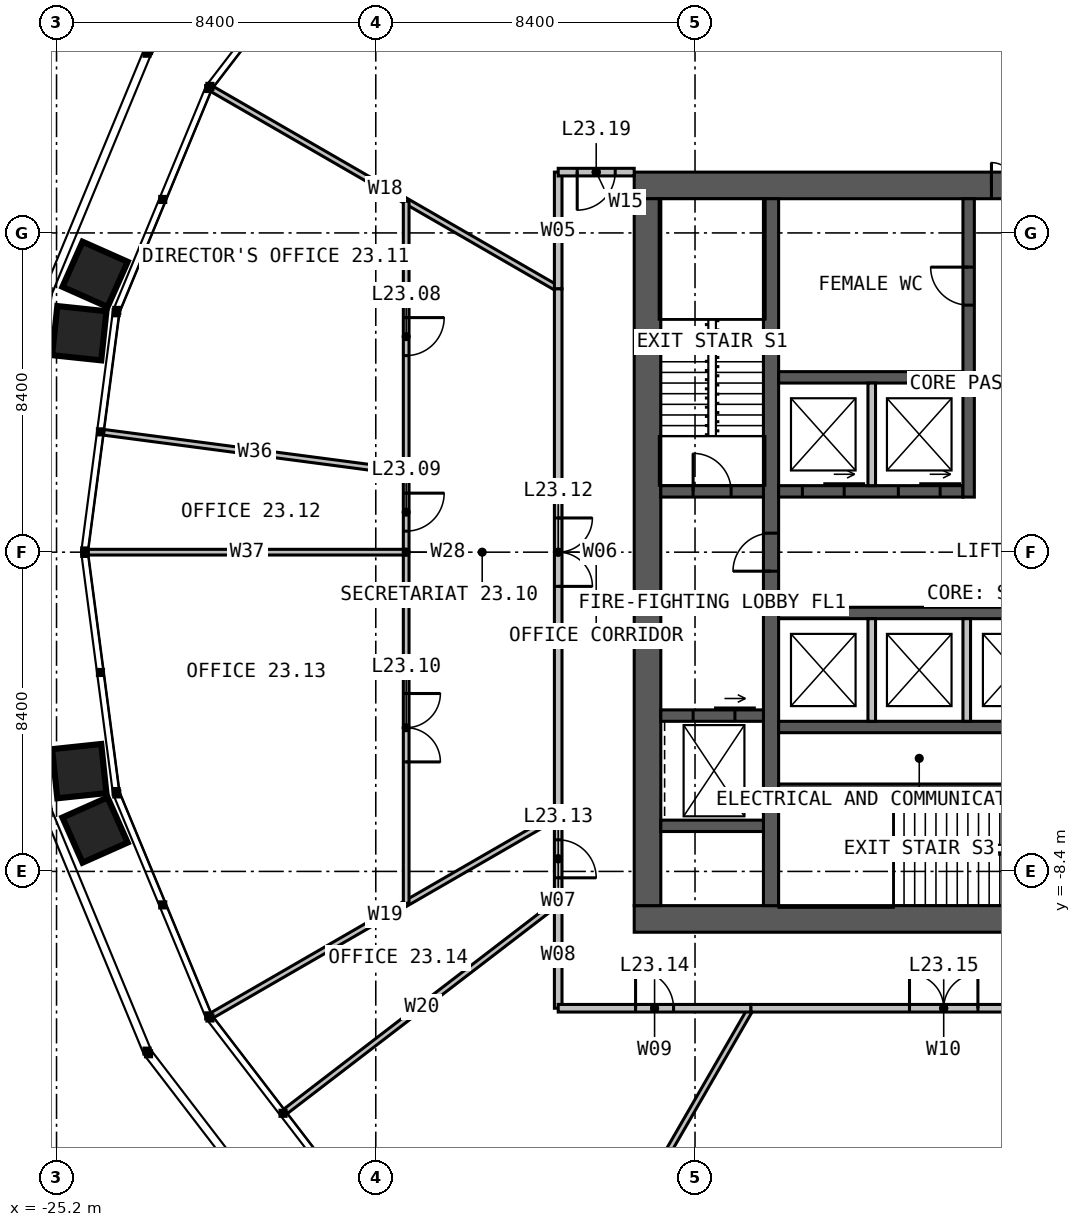
"""IFC4 building model, lengths in metres.
Left out: names, types, materials, properties, quantities, classifications, styles, units other than length and angle.
Written with IfcOpenShell. Run it as: python <this file> out.ifc"""

import sys

from ifc_helpers import new_model, si_unit, direction, frame, frame_2d, origin, place, context, subcontext, project, spatial, rectangle, extrude, element, fill, save


model = new_model("IFC4")
c1 = context("Model", 3, precision=1e-05, world=origin(), true_north=direction((0.0, 1.0)))
c2 = subcontext(c1, "Body", "Model", "MODEL_VIEW")
j1 = project(units=[si_unit("LENGTHUNIT", "METRE"), si_unit("PLANEANGLEUNIT", "RADIAN")], contexts=[c1])
p1 = place(None, origin())
s1 = spatial("IfcSite", under=j1, at=p1, CompositionType="ELEMENT")
p2 = place(p1, origin())
s2 = spatial("IfcBuilding", under=s1, at=p2, CompositionType="ELEMENT")
p3 = place(p2, frame((0.0, 0.0, 98.0)))
s3 = spatial("IfcBuildingStorey", under=s2, at=p3, CompositionType="ELEMENT", Elevation=98.0)
p4 = place(p3, frame((-10.0, 9.65, 0.0), z_axis=(0.0, 0.0, 1.0), x_axis=(1.0, 0.0, 0.0)))
e1 = element("IfcWall", 1, at=p4, inside=s3, PredefinedType="SOLIDWALL", context=c2, shape_type="SweptSolid", body=[
    extrude(rectangle(XDim=20.0, YDim=0.7, at=frame_2d((10.0, 0.0))), origin(), (0.0, 0.0, 1.0), 4.0),
])
p5 = place(p4, frame((9.4, 0.0, 0.0)))
e2 = element("IfcOpeningElement", 2, at=p5, cuts=e1, PredefinedType="OPENING", context=c2, shape_type="SweptSolid", body=[
    extrude(rectangle(XDim=1.2, YDim=2.2, at=frame_2d((0.6, 1.1))), frame((0.0, 0.36, 0.0), z_axis=(0.0, -1.0, 0.0), x_axis=(1.0, 0.0, 0.0)), (0.0, 0.0, 1.0), 0.72),
])
p6 = place(p3, frame((10.0, -9.65, 0.0), z_axis=(0.0, 0.0, 1.0), x_axis=(-1.0, 0.0, 0.0)))
e3 = element("IfcWall", 3, at=p6, inside=s3, PredefinedType="SOLIDWALL", context=c2, shape_type="SweptSolid", body=[
    extrude(rectangle(XDim=20.0, YDim=0.7, at=frame_2d((10.0, 0.0))), origin(), (0.0, 0.0, 1.0), 4.0),
])
p7 = place(p6, frame((6.875, 0.0, 0.0)))
e4 = element("IfcOpeningElement", 4, at=p7, cuts=e3, PredefinedType="OPENING", context=c2, shape_type="SweptSolid", body=[
    extrude(rectangle(XDim=1.2, YDim=2.2, at=frame_2d((0.6, 1.1))), frame((0.0, 0.36, 0.0), z_axis=(0.0, -1.0, 0.0), x_axis=(1.0, 0.0, 0.0)), (0.0, 0.0, 1.0), 0.72),
])
p8 = place(p3, frame((-9.65, 9.3, 0.0), z_axis=(0.0, 0.0, 1.0), x_axis=(0.0, -1.0, 0.0)))
e5 = element("IfcWall", 5, at=p8, inside=s3, PredefinedType="SOLIDWALL", context=c2, shape_type="SweptSolid", body=[
    extrude(rectangle(XDim=18.6, YDim=0.7, at=frame_2d((9.3, 0.0))), origin(), (0.0, 0.0, 1.0), 4.0),
])
p9 = place(p3, frame((-6.4, -9.3, 0.0), z_axis=(0.0, 0.0, 1.0), x_axis=(0.0, 1.0, 0.0)))
e6 = element("IfcWall", 6, at=p9, inside=s3, PredefinedType="SOLIDWALL", context=c2, shape_type="SweptSolid", body=[
    extrude(rectangle(XDim=18.6, YDim=0.4, at=frame_2d((9.3, 0.0))), origin(), (0.0, 0.0, 1.0), 4.0),
])
p10 = place(p9, frame((8.8, 0.0, 0.0)))
e7 = element("IfcOpeningElement", 7, at=p10, cuts=e6, PredefinedType="OPENING", context=c2, shape_type="SweptSolid", body=[
    extrude(rectangle(XDim=1.0, YDim=2.2, at=frame_2d((0.5, 1.1))), frame((0.0, 0.21, 0.0), z_axis=(0.0, -1.0, 0.0), x_axis=(1.0, 0.0, 0.0)), (0.0, 0.0, 1.0), 0.42),
])
p11 = place(p3, frame((-6.2, 1.6, 0.0), z_axis=(0.0, 0.0, 1.0), x_axis=(1.0, 0.0, 0.0)))
e8 = element("IfcWall", 8, at=p11, inside=s3, PredefinedType="SOLIDWALL", context=c2, shape_type="SweptSolid", body=[
    extrude(rectangle(XDim=4.85, YDim=0.3, at=frame_2d((2.425, 0.0))), origin(), (0.0, 0.0, 1.0), 4.0),
])
p12 = place(p11, frame((0.625, 0.0, 0.0)))
e9 = element("IfcOpeningElement", 9, at=p12, cuts=e8, PredefinedType="OPENING", context=c2, shape_type="SweptSolid", body=[
    extrude(rectangle(XDim=1.1, YDim=2.2, at=frame_2d((0.55, 1.1))), frame((0.0, 0.16, 0.0), z_axis=(0.0, -1.0, 0.0), x_axis=(1.0, 0.0, 0.0)), (0.0, 0.0, 1.0), 0.32),
])
p13 = place(p11, frame((3.15, 0.0, 0.0)))
e10 = element("IfcOpeningElement", 10, at=p13, cuts=e8, PredefinedType="OPENING", context=c2, shape_type="SweptSolid", body=[
    extrude(rectangle(XDim=1.1, YDim=2.2, at=frame_2d((0.55, 1.1))), frame((0.0, 0.16, 0.0), z_axis=(0.0, -1.0, 0.0), x_axis=(1.0, 0.0, 0.0)), (0.0, 0.0, 1.0), 0.32),
])
p14 = place(p3, frame((-6.2, 4.6, 0.0), z_axis=(0.0, 0.0, 1.0), x_axis=(1.0, 0.0, 0.0)))
e11 = element("IfcWall", 11, at=p14, inside=s3, PredefinedType="SOLIDWALL", context=c2, shape_type="SweptSolid", body=[
    extrude(rectangle(XDim=4.85, YDim=0.3, at=frame_2d((2.425, 0.0))), origin(), (0.0, 0.0, 1.0), 4.0),
])
p15 = place(p3, frame((-1.2, 1.45, 0.0), z_axis=(0.0, 0.0, 1.0), x_axis=(0.0, 1.0, 0.0)))
e12 = element("IfcWall", 12, at=p15, inside=s3, PredefinedType="SOLIDWALL", context=c2, shape_type="SweptSolid", body=[
    extrude(rectangle(XDim=7.85, YDim=0.3, at=frame_2d((3.925, 0.0))), origin(), (0.0, 0.0, 1.0), 4.0),
])
p16 = place(p15, frame((5.05, 0.0, 0.0)))
e13 = element("IfcOpeningElement", 13, at=p16, cuts=e12, PredefinedType="OPENING", context=c2, shape_type="SweptSolid", body=[
    extrude(rectangle(XDim=1.0, YDim=2.2, at=frame_2d((0.5, 1.1))), frame((0.0, 0.16, 0.0), z_axis=(0.0, -1.0, 0.0), x_axis=(1.0, 0.0, 0.0)), (0.0, 0.0, 1.0), 0.32),
])
for number, where, z_axis, x_axis in (
    (14, (-6.2, -1.6, 0.0), (0.0, 0.0, 1.0), (1.0, 0.0, 0.0)),
    (15, (-6.2, -4.6, 0.0), (0.0, 0.0, 1.0), (1.0, 0.0, 0.0)),
):
    element("IfcWall", number, at=place(p3, frame(where, z_axis=z_axis, x_axis=x_axis)), inside=s3, PredefinedType="SOLIDWALL", context=c2, shape_type="SweptSolid", body=[
        extrude(rectangle(XDim=7.4, YDim=0.3, at=frame_2d((3.7, 0.0))), origin(), (0.0, 0.0, 1.0), 4.0),
    ])
p17 = place(p3, frame((-6.2, -6.2, 0.0), z_axis=(0.0, 0.0, 1.0), x_axis=(1.0, 0.0, 0.0)))
e16 = element("IfcWall", 16, at=p17, inside=s3, PredefinedType="SOLIDWALL", context=c2, shape_type="SweptSolid", body=[
    extrude(rectangle(XDim=7.4, YDim=0.2, at=frame_2d((3.7, 0.0))), origin(), (0.0, 0.0, 1.0), 4.0),
])
p18 = place(p3, frame((-9.3, 1.6, 0.0), z_axis=(0.0, 0.0, 1.0), x_axis=(1.0, 0.0, 0.0)))
e17 = element("IfcWall", 17, at=p18, inside=s3, PredefinedType="SOLIDWALL", context=c2, shape_type="SweptSolid", body=[
    extrude(rectangle(XDim=2.7, YDim=0.3, at=frame_2d((1.35, 0.0))), origin(), (0.0, 0.0, 1.0), 4.0),
])
p19 = place(p18, frame((0.85, 0.0, 0.0)))
e18 = element("IfcOpeningElement", 18, at=p19, cuts=e17, PredefinedType="OPENING", context=c2, shape_type="SweptSolid", body=[
    extrude(rectangle(XDim=1.0, YDim=2.2, at=frame_2d((0.5, 1.1))), frame((0.0, 0.16, 0.0), z_axis=(0.0, -1.0, 0.0), x_axis=(1.0, 0.0, 0.0)), (0.0, 0.0, 1.0), 0.32),
])
p20 = place(p3, frame((-9.3, -4.3, 0.0), z_axis=(0.0, 0.0, 1.0), x_axis=(1.0, 0.0, 0.0)))
e19 = element("IfcWall", 19, at=p20, inside=s3, PredefinedType="SOLIDWALL", context=c2, shape_type="SweptSolid", body=[
    extrude(rectangle(XDim=2.7, YDim=0.3, at=frame_2d((1.35, 0.0))), origin(), (0.0, 0.0, 1.0), 4.0),
])
p21 = place(p20, frame((0.85, 0.0, 0.0)))
e20 = element("IfcOpeningElement", 20, at=p21, cuts=e19, PredefinedType="OPENING", context=c2, shape_type="SweptSolid", body=[
    extrude(rectangle(XDim=1.1, YDim=2.2, at=frame_2d((0.55, 1.1))), frame((0.0, 0.16, 0.0), z_axis=(0.0, -1.0, 0.0), x_axis=(1.0, 0.0, 0.0)), (0.0, 0.0, 1.0), 0.32),
])
p22 = place(p3, frame((-9.3, -7.2, 0.0), z_axis=(0.0, 0.0, 1.0), x_axis=(1.0, 0.0, 0.0)))
e21 = element("IfcWall", 21, at=p22, inside=s3, PredefinedType="SOLIDWALL", context=c2, shape_type="SweptSolid", body=[
    extrude(rectangle(XDim=2.7, YDim=0.3, at=frame_2d((1.35, 0.0))), origin(), (0.0, 0.0, 1.0), 4.0),
])
for number, where, z_axis, x_axis in (
    (22, (-3.75, 1.75, 0.0), (0.0, 0.0, 1.0), (0.0, 1.0, 0.0)),
    (23, (-3.75, -1.75, 0.0), (0.0, 0.0, 1.0), (0.0, -1.0, 0.0)),
    (24, (-1.25, -1.75, 0.0), (0.0, 0.0, 1.0), (0.0, -1.0, 0.0)),
):
    element("IfcWall", number, at=place(p3, frame(where, z_axis=z_axis, x_axis=x_axis)), inside=s3, PredefinedType="SOLIDWALL", context=c2, shape_type="SweptSolid", body=[
        extrude(rectangle(XDim=2.7, YDim=0.2, at=frame_2d((1.35, 0.0))), origin(), (0.0, 0.0, 1.0), 3.75),
    ])
for number, where, z_axis, x_axis in (
    (25, (-12.0, 6.928, 0.0), (0.0, 0.0, 1.0), (-0.866, 0.5, 0.0)),
    (26, (-12.0, -6.928, 0.0), (0.0, 0.0, 1.0), (-0.866, -0.5, 0.0)),
):
    element("IfcWall", number, at=place(p3, frame(where, z_axis=z_axis, x_axis=x_axis)), inside=s3, PredefinedType="PARTITIONING", context=c2, shape_type="SweptSolid", body=[
        extrude(rectangle(XDim=10.514, YDim=0.15, at=frame_2d((5.257, 0.0))), origin(), (0.0, 0.0, 1.0), 2.79),
    ])
p23 = place(p3, frame((-12.0, -9.208, 0.0), z_axis=(0.0, 0.0, 1.0), x_axis=(-0.793353631913, -0.60876104896, 0.0)))
e27 = element("IfcWall", 27, at=p23, inside=s3, PredefinedType="PARTITIONING", context=c2, shape_type="SweptSolid", body=[
    extrude(rectangle(XDim=9.036, YDim=0.15, at=frame_2d((4.518, 0.0))), origin(), (0.0, 0.0, 1.0), 2.79),
])
p24 = place(p3, frame((-6.928, -12.0, 0.0), z_axis=(0.0, 0.0, 1.0), x_axis=(-0.499995153367, -0.866028201971, 0.0)))
e28 = element("IfcWall", 28, at=p24, inside=s3, PredefinedType="PARTITIONING", context=c2, shape_type="SweptSolid", body=[
    extrude(rectangle(XDim=10.514, YDim=0.15, at=frame_2d((5.257, 0.0))), origin(), (0.0, 0.0, 1.0), 2.79),
])
p25 = place(p3, frame((-12.0, 10.0, 0.0), z_axis=(0.0, 0.0, 1.0), x_axis=(0.0, -1.0, 0.0)))
e29 = element("IfcWall", 29, at=p25, inside=s3, PredefinedType="PARTITIONING", context=c2, shape_type="SweptSolid", body=[
    extrude(rectangle(XDim=3.072, YDim=0.2, at=frame_2d((1.536, 0.0))), origin(), (0.0, 0.0, 1.0), 3.8),
])
p26 = place(p3, frame((-16.0, 9.238, 0.0), z_axis=(0.0, 0.0, 1.0), x_axis=(0.0, -1.0, 0.0)))
e30 = element("IfcWall", 30, at=p26, inside=s3, PredefinedType="PARTITIONING", context=c2, shape_type="SweptSolid", body=[
    extrude(rectangle(XDim=18.475, YDim=0.15, at=frame_2d((9.238, 0.0))), origin(), (0.0, 0.0, 1.0), 2.79),
])
p27 = place(p26, frame((3.066, 0.0, 0.0)))
e31 = element("IfcOpeningElement", 31, at=p27, cuts=e30, PredefinedType="OPENING", context=c2, shape_type="SweptSolid", body=[
    extrude(rectangle(XDim=1.0, YDim=2.2, at=frame_2d((0.5, 1.1))), frame((0.0, 0.085, 0.0), z_axis=(0.0, -1.0, 0.0), x_axis=(1.0, 0.0, 0.0)), (0.0, 0.0, 1.0), 0.17),
])
p28 = place(p26, frame((7.684, 0.0, 0.0)))
e32 = element("IfcOpeningElement", 32, at=p28, cuts=e30, PredefinedType="OPENING", context=c2, shape_type="SweptSolid", body=[
    extrude(rectangle(XDim=1.0, YDim=2.2, at=frame_2d((0.5, 1.1))), frame((0.0, 0.085, 0.0), z_axis=(0.0, -1.0, 0.0), x_axis=(1.0, 0.0, 0.0)), (0.0, 0.0, 1.0), 0.17),
])
p29 = place(p26, frame((12.956, 0.0, 0.0)))
e33 = element("IfcOpeningElement", 33, at=p29, cuts=e30, PredefinedType="OPENING", context=c2, shape_type="SweptSolid", body=[
    extrude(rectangle(XDim=1.8, YDim=2.2, at=frame_2d((0.9, 1.1))), frame((0.0, 0.085, 0.0), z_axis=(0.0, -1.0, 0.0), x_axis=(1.0, 0.0, 0.0)), (0.0, 0.0, 1.0), 0.17),
])
p30 = place(p3, frame((-16.0, 2.106, 0.0), z_axis=(0.0, 0.0, 1.0), x_axis=(-0.991443935943, 0.130533221372, 0.0)))
e34 = element("IfcWall", 34, at=p30, inside=s3, PredefinedType="PARTITIONING", context=c2, shape_type="SweptSolid", body=[
    extrude(rectangle(XDim=8.024, YDim=0.15, at=frame_2d((4.012, 0.0))), origin(), (0.0, 0.0, 1.0), 2.79),
])
p31 = place(p3, frame((-16.0, 0.0, 0.0), z_axis=(0.0, 0.0, 1.0), x_axis=(-1.0, 0.0, 0.0)))
e35 = element("IfcWall", 35, at=p31, inside=s3, PredefinedType="PARTITIONING", context=c2, shape_type="SweptSolid", body=[
    extrude(rectangle(XDim=8.37, YDim=0.15, at=frame_2d((4.185, 0.0))), origin(), (0.0, 0.0, 1.0), 2.79),
])
p32 = place(p3, frame((-12.0, 6.928, 0.0), z_axis=(0.0, 0.0, 1.0), x_axis=(0.0, -1.0, 0.0)))
e36 = element("IfcWall", 36, at=p32, inside=s3, PredefinedType="PARTITIONING", context=c2, shape_type="SweptSolid", body=[
    extrude(rectangle(XDim=13.856, YDim=0.2, at=frame_2d((6.928, 0.0))), origin(), (0.0, 0.0, 1.0), 3.8),
])
p33 = place(p32, frame((6.028, 0.0, 0.0)))
e37 = element("IfcOpeningElement", 37, at=p33, cuts=e36, PredefinedType="OPENING", context=c2, shape_type="SweptSolid", body=[
    extrude(rectangle(XDim=1.8, YDim=2.2, at=frame_2d((0.9, 1.1))), frame((0.0, 0.11, 0.0), z_axis=(0.0, -1.0, 0.0), x_axis=(1.0, 0.0, 0.0)), (0.0, 0.0, 1.0), 0.22),
])
p34 = place(p3, frame((-12.0, -6.928, 0.0), z_axis=(0.0, 0.0, 1.0), x_axis=(0.0, -1.0, 0.0)))
e38 = element("IfcWall", 38, at=p34, inside=s3, PredefinedType="PARTITIONING", context=c2, shape_type="SweptSolid", body=[
    extrude(rectangle(XDim=2.28, YDim=0.2, at=frame_2d((1.14, 0.0))), origin(), (0.0, 0.0, 1.0), 3.8),
])
p35 = place(p34, frame((0.64, 0.0, 0.0)))
e39 = element("IfcOpeningElement", 39, at=p35, cuts=e38, PredefinedType="OPENING", context=c2, shape_type="SweptSolid", body=[
    extrude(rectangle(XDim=1.0, YDim=2.2, at=frame_2d((0.5, 1.1))), frame((0.0, 0.11, 0.0), z_axis=(0.0, -1.0, 0.0), x_axis=(1.0, 0.0, 0.0)), (0.0, 0.0, 1.0), 0.22),
])
p36 = place(p3, frame((-12.0, -9.208, 0.0), z_axis=(0.0, 0.0, 1.0), x_axis=(0.0, -1.0, 0.0)))
e40 = element("IfcWall", 40, at=p36, inside=s3, PredefinedType="PARTITIONING", context=c2, shape_type="SweptSolid", body=[
    extrude(rectangle(XDim=2.792, YDim=0.2, at=frame_2d((1.396, 0.0))), origin(), (0.0, 0.0, 1.0), 3.8),
])
p37 = place(p3, frame((-12.0, -12.0, 0.0), z_axis=(0.0, 0.0, 1.0), x_axis=(1.0, 0.0, 0.0)))
e41 = element("IfcWall", 41, at=p37, inside=s3, PredefinedType="PARTITIONING", context=c2, shape_type="SweptSolid", body=[
    extrude(rectangle(XDim=5.072, YDim=0.2, at=frame_2d((2.536, 0.0))), origin(), (0.0, 0.0, 1.0), 3.8),
])
p38 = place(p37, frame((2.036, 0.0, 0.0)))
e42 = element("IfcOpeningElement", 42, at=p38, cuts=e41, PredefinedType="OPENING", context=c2, shape_type="SweptSolid", body=[
    extrude(rectangle(XDim=1.0, YDim=2.2, at=frame_2d((0.5, 1.1))), frame((0.0, 0.11, 0.0), z_axis=(0.0, -1.0, 0.0), x_axis=(1.0, 0.0, 0.0)), (0.0, 0.0, 1.0), 0.22),
])
p39 = place(p3, frame((-6.928, -12.0, 0.0), z_axis=(0.0, 0.0, 1.0), x_axis=(1.0, 0.0, 0.0)))
e43 = element("IfcWall", 43, at=p39, inside=s3, PredefinedType="PARTITIONING", context=c2, shape_type="SweptSolid", body=[
    extrude(rectangle(XDim=10.144, YDim=0.2, at=frame_2d((5.072, 0.0))), origin(), (0.0, 0.0, 1.0), 3.8),
])
p40 = place(p39, frame((4.172, 0.0, 0.0)))
e44 = element("IfcOpeningElement", 44, at=p40, cuts=e43, PredefinedType="OPENING", context=c2, shape_type="SweptSolid", body=[
    extrude(rectangle(XDim=1.8, YDim=2.2, at=frame_2d((0.9, 1.1))), frame((0.0, 0.11, 0.0), z_axis=(0.0, -1.0, 0.0), x_axis=(1.0, 0.0, 0.0)), (0.0, 0.0, 1.0), 0.22),
])
p41 = place(p3, frame((-10.0, 10.0, 0.0), z_axis=(0.0, 0.0, 1.0), x_axis=(-1.0, 0.0, 0.0)))
e45 = element("IfcWall", 45, at=p41, inside=s3, PredefinedType="PARTITIONING", context=c2, shape_type="SweptSolid", body=[
    extrude(rectangle(XDim=2.0, YDim=0.2, at=frame_2d((1.0, 0.0))), origin(), (0.0, 0.0, 1.0), 3.8),
])
p42 = place(p41, frame((0.5, 0.0, 0.0)))
e46 = element("IfcOpeningElement", 46, at=p42, cuts=e45, PredefinedType="OPENING", context=c2, shape_type="SweptSolid", body=[
    extrude(rectangle(XDim=1.0, YDim=2.2, at=frame_2d((0.5, 1.1))), frame((0.0, 0.11, 0.0), z_axis=(0.0, -1.0, 0.0), x_axis=(1.0, 0.0, 0.0)), (0.0, 0.0, 1.0), 0.22),
])
p43 = place(p5, origin())
e47 = element("IfcDoor", 47, at=p43, inside=s3, OperationType="DOUBLE_DOOR_SINGLE_SWING", PredefinedType="DOOR", context=c2, shape_type="SweptSolid", body=[
    extrude(rectangle(XDim=1.2, YDim=2.2, at=frame_2d((0.6, 1.1))), frame((0.0, 0.025, 0.0), z_axis=(0.0, -1.0, 0.0), x_axis=(1.0, 0.0, 0.0)), (0.0, 0.0, 1.0), 0.05),
])
fill(e2, e47)
p44 = place(p10, origin())
e48 = element("IfcDoor", 48, at=p44, inside=s3, OperationType="SINGLE_SWING_LEFT", PredefinedType="DOOR", context=c2, shape_type="SweptSolid", body=[
    extrude(rectangle(XDim=1.0, YDim=2.2, at=frame_2d((0.5, 1.1))), frame((0.0, 0.025, 0.0), z_axis=(0.0, -1.0, 0.0), x_axis=(1.0, 0.0, 0.0)), (0.0, 0.0, 1.0), 0.05),
])
fill(e7, e48)
p45 = place(p19, origin())
e49 = element("IfcDoor", 49, at=p45, inside=s3, OperationType="SINGLE_SWING_LEFT", PredefinedType="DOOR", context=c2, shape_type="SweptSolid", body=[
    extrude(rectangle(XDim=1.0, YDim=2.2, at=frame_2d((0.5, 1.1))), frame((0.0, 0.025, 0.0), z_axis=(0.0, -1.0, 0.0), x_axis=(1.0, 0.0, 0.0)), (0.0, 0.0, 1.0), 0.05),
])
fill(e18, e49)
p46 = place(p16, origin())
e50 = element("IfcDoor", 50, at=p46, inside=s3, OperationType="SINGLE_SWING_RIGHT", PredefinedType="DOOR", context=c2, shape_type="SweptSolid", body=[
    extrude(rectangle(XDim=1.0, YDim=2.2, at=frame_2d((0.5, 1.1))), frame((0.0, 0.025, 0.0), z_axis=(0.0, -1.0, 0.0), x_axis=(1.0, 0.0, 0.0)), (0.0, 0.0, 1.0), 0.05),
])
fill(e13, e50)
p47 = place(p12, origin())
e51 = element("IfcDoor", 51, at=p47, inside=s3, OperationType="SLIDING_TO_LEFT", PredefinedType="DOOR", context=c2, shape_type="SweptSolid", body=[
    extrude(rectangle(XDim=1.1, YDim=2.2, at=frame_2d((0.55, 1.1))), frame((0.0, 0.025, 0.0), z_axis=(0.0, -1.0, 0.0), x_axis=(1.0, 0.0, 0.0)), (0.0, 0.0, 1.0), 0.05),
])
fill(e9, e51)
p48 = place(p13, origin())
e52 = element("IfcDoor", 52, at=p48, inside=s3, OperationType="SLIDING_TO_LEFT", PredefinedType="DOOR", context=c2, shape_type="SweptSolid", body=[
    extrude(rectangle(XDim=1.1, YDim=2.2, at=frame_2d((0.55, 1.1))), frame((0.0, 0.025, 0.0), z_axis=(0.0, -1.0, 0.0), x_axis=(1.0, 0.0, 0.0)), (0.0, 0.0, 1.0), 0.05),
])
fill(e10, e52)
p49 = place(p21, origin())
e53 = element("IfcDoor", 53, at=p49, inside=s3, OperationType="SLIDING_TO_LEFT", PredefinedType="DOOR", context=c2, shape_type="SweptSolid", body=[
    extrude(rectangle(XDim=1.1, YDim=2.2, at=frame_2d((0.55, 1.1))), frame((0.0, 0.025, 0.0), z_axis=(0.0, -1.0, 0.0), x_axis=(1.0, 0.0, 0.0)), (0.0, 0.0, 1.0), 0.05),
])
fill(e20, e53)
p50 = place(p27, origin())
e54 = element("IfcDoor", 54, at=p50, inside=s3, OperationType="SINGLE_SWING_LEFT", PredefinedType="DOOR", context=c2, shape_type="SweptSolid", body=[
    extrude(rectangle(XDim=1.0, YDim=2.2, at=frame_2d((0.5, 1.1))), frame((0.0, 0.025, 0.0), z_axis=(0.0, -1.0, 0.0), x_axis=(1.0, 0.0, 0.0)), (0.0, 0.0, 1.0), 0.05),
])
fill(e31, e54)
p51 = place(p28, origin())
e55 = element("IfcDoor", 55, at=p51, inside=s3, OperationType="SINGLE_SWING_LEFT", PredefinedType="DOOR", context=c2, shape_type="SweptSolid", body=[
    extrude(rectangle(XDim=1.0, YDim=2.2, at=frame_2d((0.5, 1.1))), frame((0.0, 0.025, 0.0), z_axis=(0.0, -1.0, 0.0), x_axis=(1.0, 0.0, 0.0)), (0.0, 0.0, 1.0), 0.05),
])
fill(e32, e55)
p52 = place(p29, origin())
e56 = element("IfcDoor", 56, at=p52, inside=s3, OperationType="DOUBLE_DOOR_SINGLE_SWING", PredefinedType="DOOR", context=c2, shape_type="SweptSolid", body=[
    extrude(rectangle(XDim=1.8, YDim=2.2, at=frame_2d((0.9, 1.1))), frame((0.0, 0.025, 0.0), z_axis=(0.0, -1.0, 0.0), x_axis=(1.0, 0.0, 0.0)), (0.0, 0.0, 1.0), 0.05),
])
fill(e33, e56)
p53 = place(p33, origin())
e57 = element("IfcDoor", 57, at=p53, inside=s3, OperationType="DOUBLE_DOOR_SINGLE_SWING", PredefinedType="DOOR", context=c2, shape_type="SweptSolid", body=[
    extrude(rectangle(XDim=1.8, YDim=2.2, at=frame_2d((0.9, 1.1))), frame((0.0, 0.025, 0.0), z_axis=(0.0, -1.0, 0.0), x_axis=(1.0, 0.0, 0.0)), (0.0, 0.0, 1.0), 0.05),
])
fill(e37, e57)
p54 = place(p35, origin())
e58 = element("IfcDoor", 58, at=p54, inside=s3, OperationType="SINGLE_SWING_RIGHT", PredefinedType="DOOR", context=c2, shape_type="SweptSolid", body=[
    extrude(rectangle(XDim=1.0, YDim=2.2, at=frame_2d((0.5, 1.1))), frame((0.0, 0.025, 0.0), z_axis=(0.0, -1.0, 0.0), x_axis=(1.0, 0.0, 0.0)), (0.0, 0.0, 1.0), 0.05),
])
fill(e39, e58)
p55 = place(p38, origin())
e59 = element("IfcDoor", 59, at=p55, inside=s3, OperationType="SINGLE_SWING_LEFT", PredefinedType="DOOR", context=c2, shape_type="SweptSolid", body=[
    extrude(rectangle(XDim=1.0, YDim=2.2, at=frame_2d((0.5, 1.1))), frame((0.0, 0.025, 0.0), z_axis=(0.0, -1.0, 0.0), x_axis=(1.0, 0.0, 0.0)), (0.0, 0.0, 1.0), 0.05),
])
fill(e42, e59)
p56 = place(p40, origin())
e60 = element("IfcDoor", 60, at=p56, inside=s3, OperationType="DOUBLE_DOOR_SINGLE_SWING", PredefinedType="DOOR", context=c2, shape_type="SweptSolid", body=[
    extrude(rectangle(XDim=1.8, YDim=2.2, at=frame_2d((0.9, 1.1))), frame((0.0, 0.025, 0.0), z_axis=(0.0, -1.0, 0.0), x_axis=(1.0, 0.0, 0.0)), (0.0, 0.0, 1.0), 0.05),
])
fill(e44, e60)
p57 = place(p42, origin())
e61 = element("IfcDoor", 61, at=p57, inside=s3, OperationType="SINGLE_SWING_RIGHT", PredefinedType="DOOR", context=c2, shape_type="SweptSolid", body=[
    extrude(rectangle(XDim=1.0, YDim=2.2, at=frame_2d((0.5, 1.1))), frame((0.0, 0.025, 0.0), z_axis=(0.0, -1.0, 0.0), x_axis=(1.0, 0.0, 0.0)), (0.0, 0.0, 1.0), 0.05),
])
fill(e46, e61)
save(model, sys.argv[1])
